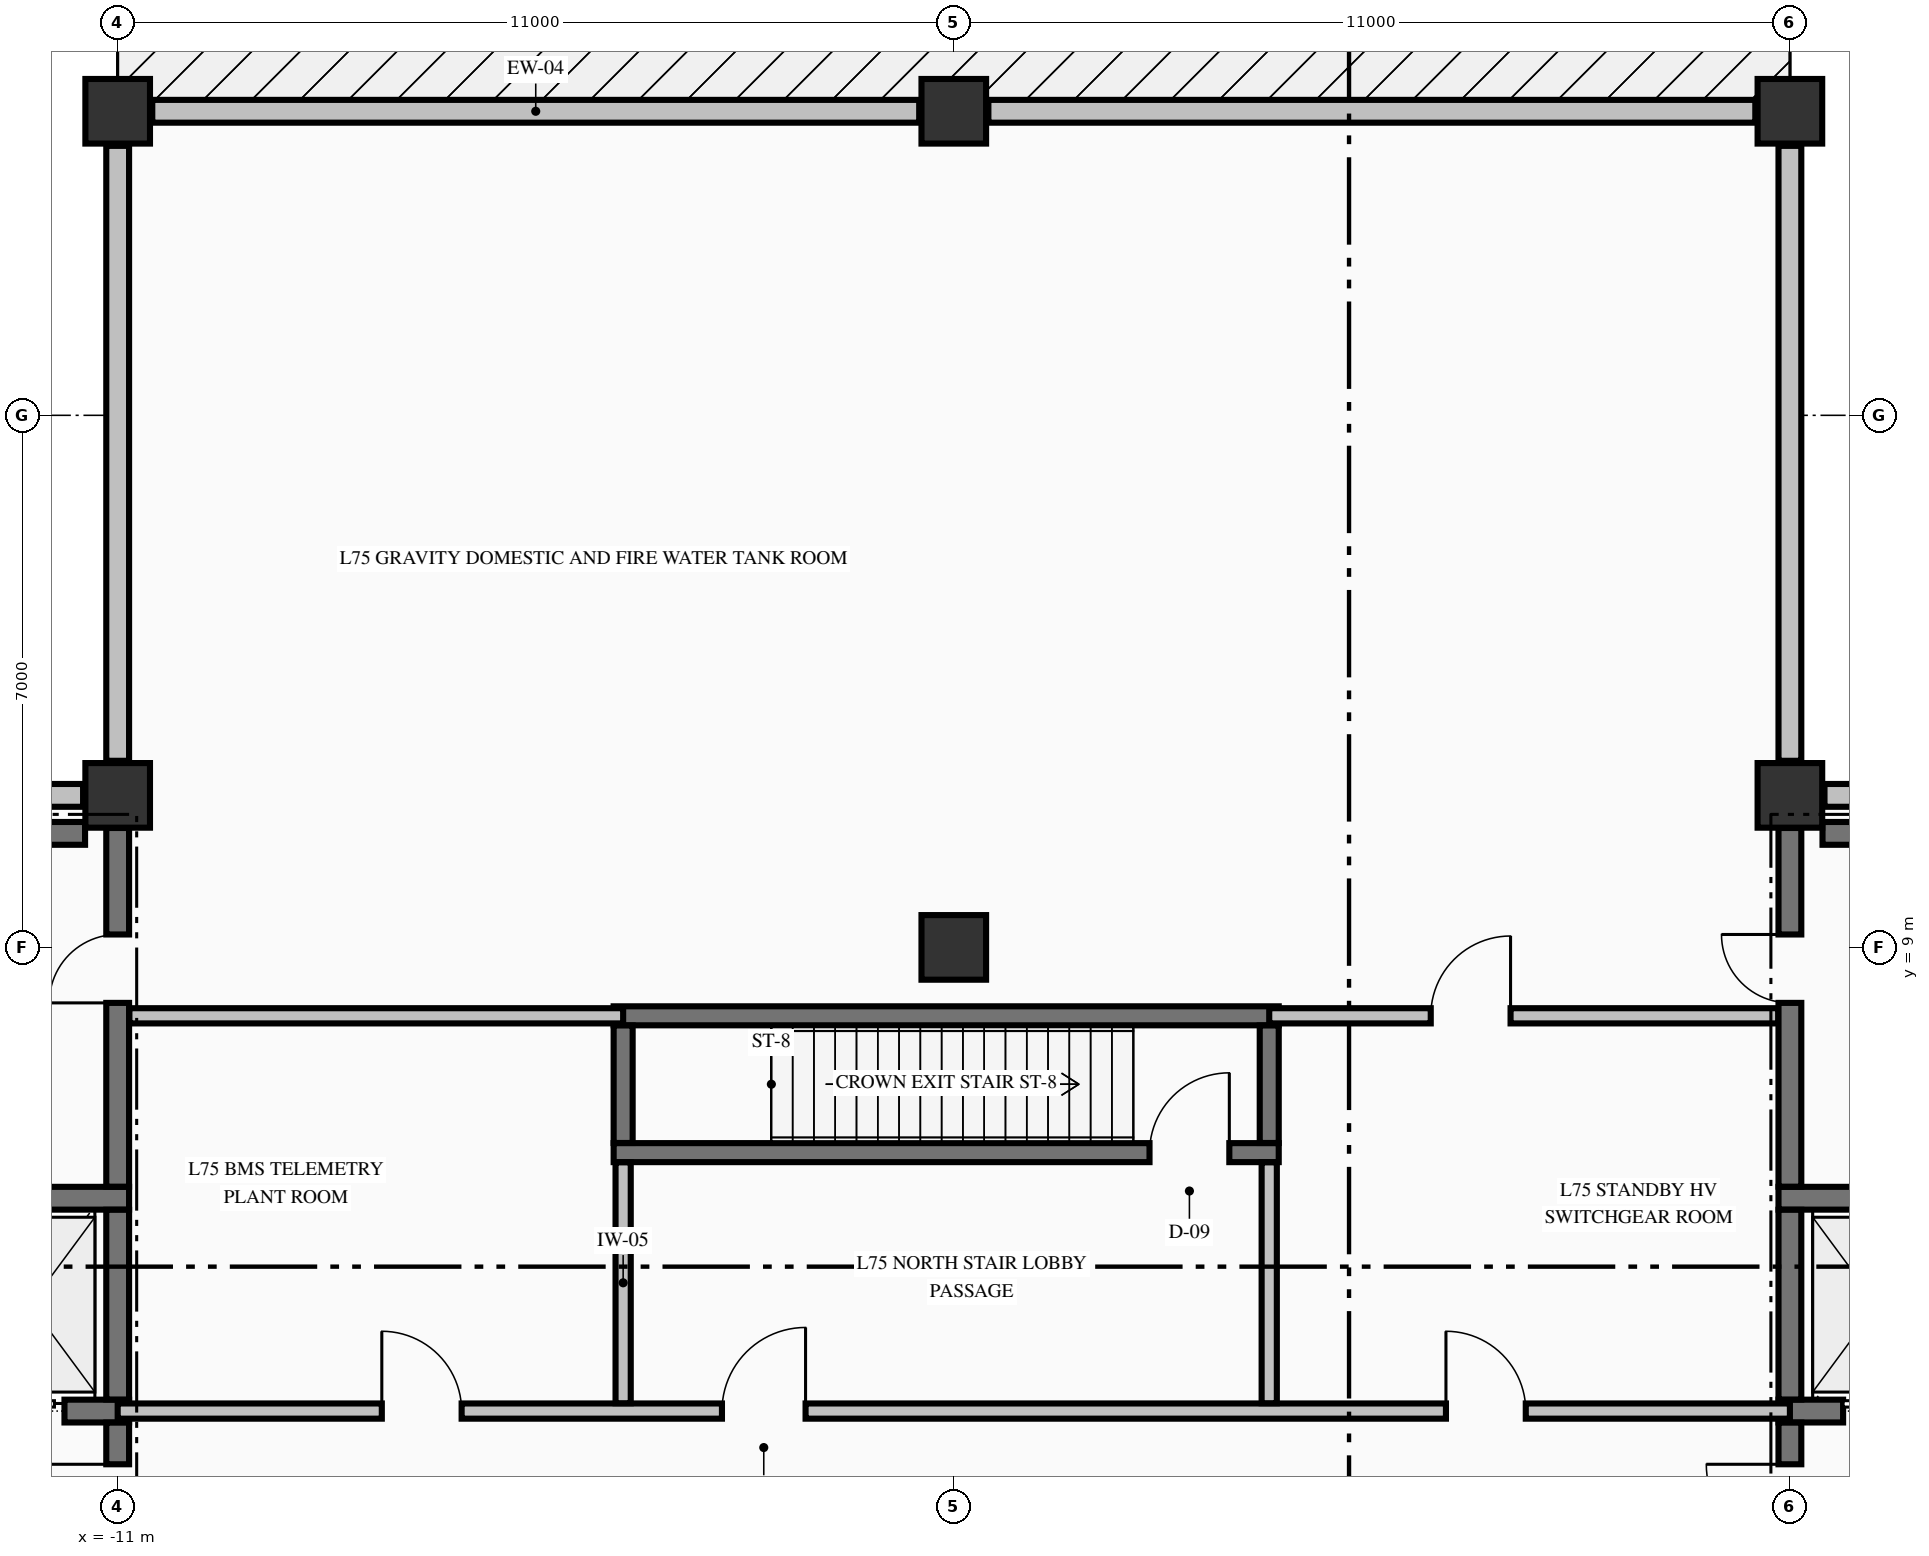
"""IFC4 building model, lengths in metres.
Left out: names, types, materials, properties, quantities, classifications, styles, units other than length and angle.
Written with IfcOpenShell. Run it as: python <this file> out.ifc"""

import sys

from ifc_helpers import new_model, si_unit, direction, frame, frame_2d, origin, origin_2d, place, context, subcontext, project, spatial, rectangle, extrude, element, fill, save


model = new_model("IFC4")
c1 = context("Model", 3, precision=1e-05, world=origin(), true_north=direction((0.0, 1.0)))
c2 = subcontext(c1, "Body", "Model", "MODEL_VIEW")
j1 = project(units=[si_unit("LENGTHUNIT", "METRE"), si_unit("PLANEANGLEUNIT", "RADIAN")], contexts=[c1])
p1 = place(None, origin())
s1 = spatial("IfcSite", under=j1, at=p1, CompositionType="ELEMENT")
p2 = place(p1, origin())
s2 = spatial("IfcBuilding", under=s1, at=p2, CompositionType="ELEMENT")
p3 = place(p2, frame((0.0, 0.0, 281.8)))
s3 = spatial("IfcBuildingStorey", under=s2, at=p3, CompositionType="ELEMENT", Elevation=281.8)
for number, where, z_axis, x_axis in (
    (1, (11.0, 20.0, -0.325), (0.0, 0.0, 1.0), (1.0, 0.0, 0.0)),
    (2, (0.0, 20.0, -0.325), (0.0, 0.0, 1.0), (1.0, 0.0, 0.0)),
    (3, (-11.0, 20.0, -0.325), (0.0, 0.0, 1.0), (1.0, 0.0, 0.0)),
    (4, (-11.0, 11.0, -0.325), (0.0, 0.0, 1.0), (1.0, 0.0, 0.0)),
    (5, (11.0, 11.0, -0.325), (0.0, 0.0, 1.0), (1.0, 0.0, 0.0)),
    (6, (0.0, 9.0, -0.325), (0.0, 0.0, 1.0), (1.0, 0.0, 0.0)),
):
    element("IfcColumn", number, at=place(p3, frame(where, z_axis=z_axis, x_axis=x_axis)), inside=s3, PredefinedType="COLUMN", context=c2, shape_type="SweptSolid", body=[
        extrude(rectangle(XDim=0.85, YDim=0.85, at=origin_2d()), origin(), (0.0, 0.0, 1.0), 3.06),
    ])
for number, where, z_axis, x_axis in (
    (7, (-0.455, 20.0, 0.0), (0.0, 0.0, 1.0), (-1.0, 0.0, 0.0)),
    (8, (10.545, 20.0, 0.0), (0.0, 0.0, 1.0), (-1.0, 0.0, 0.0)),
):
    element("IfcWall", number, at=place(p3, frame(where, z_axis=z_axis, x_axis=x_axis)), inside=s3, PredefinedType="STANDARD", context=c2, shape_type="SweptSolid", body=[
        extrude(rectangle(XDim=10.09, YDim=0.3, at=frame_2d((5.045, 0.0))), origin(), (0.0, 0.0, 1.0), 2.127),
    ])
p4 = place(p3, frame((19.545, 11.0, 0.0), z_axis=(0.0, 0.0, 1.0), x_axis=(-1.0, 0.0, 0.0)))
e9 = element("IfcWall", 9, at=p4, inside=s3, PredefinedType="STANDARD", context=c2, shape_type="SweptSolid", body=[
    extrude(rectangle(XDim=8.09, YDim=0.3, at=frame_2d((4.045, 0.0))), origin(), (0.0, 0.0, 1.0), 1.077),
])
for number, where, z_axis, x_axis in (
    (10, (11.0, 11.455, 0.0), (0.0, 0.0, 1.0), (0.0, 1.0, 0.0)),
    (11, (-11.0, 19.545, 0.0), (0.0, 0.0, 1.0), (0.0, -1.0, 0.0)),
):
    element("IfcWall", number, at=place(p3, frame(where, z_axis=z_axis, x_axis=x_axis)), inside=s3, PredefinedType="STANDARD", context=c2, shape_type="SweptSolid", body=[
        extrude(rectangle(XDim=8.09, YDim=0.3, at=frame_2d((4.045, 0.0))), origin(), (0.0, 0.0, 1.0), 0.927),
    ])
p5 = place(p3, frame((-11.455, 11.0, 0.0), z_axis=(0.0, 0.0, 1.0), x_axis=(-1.0, 0.0, 0.0)))
e12 = element("IfcWall", 12, at=p5, inside=s3, PredefinedType="STANDARD", context=c2, shape_type="SweptSolid", body=[
    extrude(rectangle(XDim=8.09, YDim=0.3, at=frame_2d((4.045, 0.0))), origin(), (0.0, 0.0, 1.0), 1.077),
])
p6 = place(p3, frame((-14.85, 2.9, 0.0), z_axis=(0.0, 0.0, 1.0), x_axis=(1.0, 0.0, 0.0)))
e13 = element("IfcWall", 13, at=p6, inside=s3, PredefinedType="SHEAR", context=c2, shape_type="SweptSolid", body=[
    extrude(rectangle(XDim=4.0, YDim=0.3, at=frame_2d((2.0, 0.0))), origin(), (0.0, 0.0, 1.0), 2.735),
])
p7 = place(p6, frame((2.05, 0.0, 0.0)))
e14 = element("IfcOpeningElement", 14, at=p7, cuts=e13, PredefinedType="OPENING", context=c2, shape_type="SweptSolid", body=[
    extrude(rectangle(XDim=1.1, YDim=2.2, at=frame_2d((0.55, 1.1))), frame((0.0, 0.16, 0.0), z_axis=(0.0, -1.0, 0.0), x_axis=(1.0, 0.0, 0.0)), (0.0, 0.0, 1.0), 0.32),
])
p8 = place(p3, frame((10.85, 2.9, 0.0), z_axis=(0.0, 0.0, 1.0), x_axis=(1.0, 0.0, 0.0)))
e15 = element("IfcWall", 15, at=p8, inside=s3, PredefinedType="SHEAR", context=c2, shape_type="SweptSolid", body=[
    extrude(rectangle(XDim=4.0, YDim=0.3, at=frame_2d((2.0, 0.0))), origin(), (0.0, 0.0, 1.0), 2.735),
])
p9 = place(p8, frame((0.85, 0.0, 0.0)))
e16 = element("IfcOpeningElement", 16, at=p9, cuts=e15, PredefinedType="OPENING", context=c2, shape_type="SweptSolid", body=[
    extrude(rectangle(XDim=1.1, YDim=2.2, at=frame_2d((0.55, 1.1))), frame((0.0, 0.16, 0.0), z_axis=(0.0, -1.0, 0.0), x_axis=(1.0, 0.0, 0.0)), (0.0, 0.0, 1.0), 0.32),
])
for number, where, z_axis, x_axis in (
    (17, (-14.85, 5.7, 0.0), (0.0, 0.0, 1.0), (1.0, 0.0, 0.0)),
    (18, (10.85, 5.7, 0.0), (0.0, 0.0, 1.0), (1.0, 0.0, 0.0)),
):
    element("IfcWall", number, at=place(p3, frame(where, z_axis=z_axis, x_axis=x_axis)), inside=s3, PredefinedType="SHEAR", context=c2, shape_type="SweptSolid", body=[
        extrude(rectangle(XDim=4.0, YDim=0.3, at=frame_2d((2.0, 0.0))), origin(), (0.0, 0.0, 1.0), 2.735),
    ])
p10 = place(p3, frame((-4.475, 6.3, 0.0), z_axis=(0.0, 0.0, 1.0), x_axis=(1.0, 0.0, 0.0)))
e19 = element("IfcWall", 19, at=p10, inside=s3, PredefinedType="SOLIDWALL", context=c2, shape_type="SweptSolid", body=[
    extrude(rectangle(XDim=8.75, YDim=0.25, at=frame_2d((4.375, 0.0))), origin(), (0.0, 0.0, 1.0), 2.735),
])
p11 = place(p10, frame((7.05, 0.0, 0.0)))
e20 = element("IfcOpeningElement", 20, at=p11, cuts=e19, PredefinedType="OPENING", context=c2, shape_type="SweptSolid", body=[
    extrude(rectangle(XDim=1.05, YDim=2.15, at=frame_2d((0.525, 1.075))), frame((0.0, 0.135, 0.0), z_axis=(0.0, -1.0, 0.0), x_axis=(1.0, 0.0, 0.0)), (0.0, 0.0, 1.0), 0.27),
])
p12 = place(p3, frame((-4.475, 8.1, 0.0), z_axis=(0.0, 0.0, 1.0), x_axis=(1.0, 0.0, 0.0)))
e21 = element("IfcWall", 21, at=p12, inside=s3, PredefinedType="SOLIDWALL", context=c2, shape_type="SweptSolid", body=[
    extrude(rectangle(XDim=8.75, YDim=0.25, at=frame_2d((4.375, 0.0))), origin(), (0.0, 0.0, 1.0), 2.735),
])
for number, where, z_axis, x_axis in (
    (22, (-14.85, 10.5, 0.0), (0.0, 0.0, 1.0), (1.0, 0.0, 0.0)),
    (23, (11.429, 10.5, 0.0), (0.0, 0.0, 1.0), (1.0, 0.0, 0.0)),
):
    element("IfcWall", number, at=place(p3, frame(where, z_axis=z_axis, x_axis=x_axis)), inside=s3, PredefinedType="SHEAR", context=c2, shape_type="SweptSolid", body=[
        extrude(rectangle(XDim=3.421, YDim=0.3, at=frame_2d((1.71, 0.0))), origin(), (0.0, 0.0, 1.0), 2.735),
    ])
p13 = place(p3, frame((-11.0, 2.9, 0.0), z_axis=(0.0, 0.0, 1.0), x_axis=(1.0, 0.0, 0.0)))
e24 = element("IfcWall", 24, at=p13, inside=s3, PredefinedType="PARTITIONING", context=c2, shape_type="SweptSolid", body=[
    extrude(rectangle(XDim=22.0, YDim=0.2, at=frame_2d((11.0, 0.0))), origin(), (0.0, 0.0, 1.0), 2.735),
])
p14 = place(p13, frame((7.95, 0.0, 0.0)))
e25 = element("IfcOpeningElement", 25, at=p14, cuts=e24, PredefinedType="OPENING", context=c2, shape_type="SweptSolid", body=[
    extrude(rectangle(XDim=1.1, YDim=2.15, at=frame_2d((0.55, 1.075))), frame((0.0, 0.11, 0.0), z_axis=(0.0, -1.0, 0.0), x_axis=(1.0, 0.0, 0.0)), (0.0, 0.0, 1.0), 0.22),
])
p15 = place(p13, frame((17.475, 0.0, 0.0)))
e26 = element("IfcOpeningElement", 26, at=p15, cuts=e24, PredefinedType="OPENING", context=c2, shape_type="SweptSolid", body=[
    extrude(rectangle(XDim=1.05, YDim=2.15, at=frame_2d((0.525, 1.075))), frame((0.0, 0.11, 0.0), z_axis=(0.0, -1.0, 0.0), x_axis=(1.0, 0.0, 0.0)), (0.0, 0.0, 1.0), 0.22),
])
p16 = place(p13, frame((3.475, 0.0, 0.0)))
e27 = element("IfcOpeningElement", 27, at=p16, cuts=e24, PredefinedType="OPENING", context=c2, shape_type="SweptSolid", body=[
    extrude(rectangle(XDim=1.05, YDim=2.15, at=frame_2d((0.525, 1.075))), frame((0.0, 0.11, 0.0), z_axis=(0.0, -1.0, 0.0), x_axis=(1.0, 0.0, 0.0)), (0.0, 0.0, 1.0), 0.22),
])
p17 = place(p3, frame((-10.847, 8.1, 0.0), z_axis=(0.0, 0.0, 1.0), x_axis=(1.0, 0.0, 0.0)))
e28 = element("IfcWall", 28, at=p17, inside=s3, PredefinedType="PARTITIONING", context=c2, shape_type="SweptSolid", body=[
    extrude(rectangle(XDim=6.497, YDim=0.2, at=frame_2d((3.249, 0.0))), origin(), (0.0, 0.0, 1.0), 2.735),
])
p18 = place(p3, frame((4.15, 8.1, 0.0), z_axis=(0.0, 0.0, 1.0), x_axis=(1.0, 0.0, 0.0)))
e29 = element("IfcWall", 29, at=p18, inside=s3, PredefinedType="PARTITIONING", context=c2, shape_type="SweptSolid", body=[
    extrude(rectangle(XDim=6.697, YDim=0.2, at=frame_2d((3.349, 0.0))), origin(), (0.0, 0.0, 1.0), 2.735),
])
p19 = place(p18, frame((2.125, 0.0, 0.0)))
e30 = element("IfcOpeningElement", 30, at=p19, cuts=e29, PredefinedType="OPENING", context=c2, shape_type="SweptSolid", body=[
    extrude(rectangle(XDim=1.05, YDim=2.15, at=frame_2d((0.525, 1.075))), frame((0.0, 0.11, 0.0), z_axis=(0.0, -1.0, 0.0), x_axis=(1.0, 0.0, 0.0)), (0.0, 0.0, 1.0), 0.22),
])
p20 = place(p3, frame((-11.0, 0.429, 0.0), z_axis=(0.0, 0.0, 1.0), x_axis=(0.0, 1.0, 0.0)))
e31 = element("IfcWall", 31, at=p20, inside=s3, PredefinedType="SHEAR", context=c2, shape_type="SweptSolid", body=[
    extrude(rectangle(XDim=2.319, YDim=0.3, at=frame_2d((1.16, 0.0))), origin(), (0.0, 0.0, 1.0), 2.735),
])
p21 = place(p20, frame((0.671, 0.0, 0.0)))
e32 = element("IfcOpeningElement", 32, at=p21, cuts=e31, PredefinedType="OPENING", context=c2, shape_type="SweptSolid", body=[
    extrude(rectangle(XDim=1.1, YDim=2.15, at=frame_2d((0.55, 1.075))), frame((0.0, 0.16, 0.0), z_axis=(0.0, -1.0, 0.0), x_axis=(1.0, 0.0, 0.0)), (0.0, 0.0, 1.0), 0.32),
])
p22 = place(p3, frame((-11.0, 3.052, 0.0), z_axis=(0.0, 0.0, 1.0), x_axis=(0.0, 1.0, 0.0)))
e33 = element("IfcWall", 33, at=p22, inside=s3, PredefinedType="SHEAR", context=c2, shape_type="SweptSolid", body=[
    extrude(rectangle(XDim=2.496, YDim=0.3, at=frame_2d((1.248, 0.0))), origin(), (0.0, 0.0, 1.0), 2.735),
])
p23 = place(p3, frame((-11.0, 5.852, 0.0), z_axis=(0.0, 0.0, 1.0), x_axis=(0.0, 1.0, 0.0)))
e34 = element("IfcWall", 34, at=p23, inside=s3, PredefinedType="SHEAR", context=c2, shape_type="SweptSolid", body=[
    extrude(rectangle(XDim=4.719, YDim=0.3, at=frame_2d((2.359, 0.0))), origin(), (0.0, 0.0, 1.0), 2.735),
])
p24 = place(p23, frame((2.418, 0.0, 0.0)))
e35 = element("IfcOpeningElement", 35, at=p24, cuts=e34, PredefinedType="OPENING", context=c2, shape_type="SweptSolid", body=[
    extrude(rectangle(XDim=0.9, YDim=2.15, at=frame_2d((0.45, 1.075))), frame((0.0, 0.16, 0.0), z_axis=(0.0, -1.0, 0.0), x_axis=(1.0, 0.0, 0.0)), (0.0, 0.0, 1.0), 0.32),
])
for number, where, z_axis, x_axis in (
    (36, (-4.35, 6.427, 0.0), (0.0, 0.0, 1.0), (0.0, 1.0, 0.0)),
    (37, (4.15, 6.427, 0.0), (0.0, 0.0, 1.0), (0.0, 1.0, 0.0)),
):
    element("IfcWall", number, at=place(p3, frame(where, z_axis=z_axis, x_axis=x_axis)), inside=s3, PredefinedType="SOLIDWALL", context=c2, shape_type="SweptSolid", body=[
        extrude(rectangle(XDim=1.546, YDim=0.25, at=frame_2d((0.773, 0.0))), origin(), (0.0, 0.0, 1.0), 2.735),
    ])
p25 = place(p3, frame((11.0, 0.429, 0.0), z_axis=(0.0, 0.0, 1.0), x_axis=(0.0, 1.0, 0.0)))
e38 = element("IfcWall", 38, at=p25, inside=s3, PredefinedType="SHEAR", context=c2, shape_type="SweptSolid", body=[
    extrude(rectangle(XDim=2.319, YDim=0.3, at=frame_2d((1.16, 0.0))), origin(), (0.0, 0.0, 1.0), 2.735),
])
p26 = place(p25, frame((0.671, 0.0, 0.0)))
e39 = element("IfcOpeningElement", 39, at=p26, cuts=e38, PredefinedType="OPENING", context=c2, shape_type="SweptSolid", body=[
    extrude(rectangle(XDim=1.1, YDim=2.15, at=frame_2d((0.55, 1.075))), frame((0.0, 0.16, 0.0), z_axis=(0.0, -1.0, 0.0), x_axis=(1.0, 0.0, 0.0)), (0.0, 0.0, 1.0), 0.32),
])
p27 = place(p3, frame((11.0, 3.052, 0.0), z_axis=(0.0, 0.0, 1.0), x_axis=(0.0, 1.0, 0.0)))
e40 = element("IfcWall", 40, at=p27, inside=s3, PredefinedType="SHEAR", context=c2, shape_type="SweptSolid", body=[
    extrude(rectangle(XDim=2.496, YDim=0.3, at=frame_2d((1.248, 0.0))), origin(), (0.0, 0.0, 1.0), 2.735),
])
p28 = place(p3, frame((11.0, 5.852, 0.0), z_axis=(0.0, 0.0, 1.0), x_axis=(0.0, 1.0, 0.0)))
e41 = element("IfcWall", 41, at=p28, inside=s3, PredefinedType="SHEAR", context=c2, shape_type="SweptSolid", body=[
    extrude(rectangle(XDim=4.719, YDim=0.3, at=frame_2d((2.359, 0.0))), origin(), (0.0, 0.0, 1.0), 2.735),
])
p29 = place(p28, frame((2.418, 0.0, 0.0)))
e42 = element("IfcOpeningElement", 42, at=p29, cuts=e41, PredefinedType="OPENING", context=c2, shape_type="SweptSolid", body=[
    extrude(rectangle(XDim=0.9, YDim=2.15, at=frame_2d((0.45, 1.075))), frame((0.0, 0.16, 0.0), z_axis=(0.0, -1.0, 0.0), x_axis=(1.0, 0.0, 0.0)), (0.0, 0.0, 1.0), 0.32),
])
for number, where, z_axis, x_axis in (
    (43, (-4.35, 3.003, 0.0), (0.0, 0.0, 1.0), (0.0, 1.0, 0.0)),
    (44, (4.15, 3.003, 0.0), (0.0, 0.0, 1.0), (0.0, 1.0, 0.0)),
):
    element("IfcWall", number, at=place(p3, frame(where, z_axis=z_axis, x_axis=x_axis)), inside=s3, PredefinedType="PARTITIONING", context=c2, shape_type="SweptSolid", body=[
        extrude(rectangle(XDim=3.169, YDim=0.2, at=frame_2d((1.584, 0.0))), origin(), (0.0, 0.0, 1.0), 2.735),
    ])
p30 = place(p21, origin())
e45 = element("IfcDoor", 45, at=p30, inside=s3, OperationType="SINGLE_SWING_RIGHT", PredefinedType="DOOR", context=c2, shape_type="SweptSolid", body=[
    extrude(rectangle(XDim=1.1, YDim=2.15, at=frame_2d((0.55, 1.075))), frame((0.0, 0.025, 0.0), z_axis=(0.0, -1.0, 0.0), x_axis=(1.0, 0.0, 0.0)), (0.0, 0.0, 1.0), 0.05),
])
fill(e32, e45)
p31 = place(p7, origin())
e46 = element("IfcDoor", 46, at=p31, inside=s3, OperationType="SLIDING_TO_LEFT", PredefinedType="DOOR", context=c2, shape_type="SweptSolid", body=[
    extrude(rectangle(XDim=1.1, YDim=2.2, at=frame_2d((0.55, 1.1))), frame((0.0, 0.025, 0.0), z_axis=(0.0, -1.0, 0.0), x_axis=(1.0, 0.0, 0.0)), (0.0, 0.0, 1.0), 0.05),
])
fill(e14, e46)
p32 = place(p26, origin())
e47 = element("IfcDoor", 47, at=p32, inside=s3, OperationType="SINGLE_SWING_RIGHT", PredefinedType="DOOR", context=c2, shape_type="SweptSolid", body=[
    extrude(rectangle(XDim=1.1, YDim=2.15, at=frame_2d((0.55, 1.075))), frame((0.0, 0.025, 0.0), z_axis=(0.0, -1.0, 0.0), x_axis=(1.0, 0.0, 0.0)), (0.0, 0.0, 1.0), 0.05),
])
fill(e39, e47)
p33 = place(p9, origin())
e48 = element("IfcDoor", 48, at=p33, inside=s3, OperationType="SLIDING_TO_RIGHT", PredefinedType="DOOR", context=c2, shape_type="SweptSolid", body=[
    extrude(rectangle(XDim=1.1, YDim=2.2, at=frame_2d((0.55, 1.1))), frame((0.0, 0.025, 0.0), z_axis=(0.0, -1.0, 0.0), x_axis=(1.0, 0.0, 0.0)), (0.0, 0.0, 1.0), 0.05),
])
fill(e16, e48)
p34 = place(p24, origin())
e49 = element("IfcDoor", 49, at=p34, inside=s3, OperationType="SINGLE_SWING_LEFT", PredefinedType="DOOR", context=c2, shape_type="SweptSolid", body=[
    extrude(rectangle(XDim=0.9, YDim=2.15, at=frame_2d((0.45, 1.075))), frame((0.0, 0.025, 0.0), z_axis=(0.0, -1.0, 0.0), x_axis=(1.0, 0.0, 0.0)), (0.0, 0.0, 1.0), 0.05),
])
fill(e35, e49)
p35 = place(p29, origin())
e50 = element("IfcDoor", 50, at=p35, inside=s3, OperationType="SINGLE_SWING_RIGHT", PredefinedType="DOOR", context=c2, shape_type="SweptSolid", body=[
    extrude(rectangle(XDim=0.9, YDim=2.15, at=frame_2d((0.45, 1.075))), frame((0.0, 0.025, 0.0), z_axis=(0.0, -1.0, 0.0), x_axis=(1.0, 0.0, 0.0)), (0.0, 0.0, 1.0), 0.05),
])
fill(e42, e50)
p36 = place(p11, origin())
e51 = element("IfcDoor", 51, at=p36, inside=s3, OperationType="SINGLE_SWING_RIGHT", PredefinedType="DOOR", context=c2, shape_type="SweptSolid", body=[
    extrude(rectangle(XDim=1.05, YDim=2.15, at=frame_2d((0.525, 1.075))), frame((0.0, 0.025, 0.0), z_axis=(0.0, -1.0, 0.0), x_axis=(1.0, 0.0, 0.0)), (0.0, 0.0, 1.0), 0.05),
])
fill(e20, e51)
p37 = place(p14, origin())
e52 = element("IfcDoor", 52, at=p37, inside=s3, OperationType="SINGLE_SWING_RIGHT", PredefinedType="DOOR", context=c2, shape_type="SweptSolid", body=[
    extrude(rectangle(XDim=1.1, YDim=2.15, at=frame_2d((0.55, 1.075))), frame((0.0, 0.025, 0.0), z_axis=(0.0, -1.0, 0.0), x_axis=(1.0, 0.0, 0.0)), (0.0, 0.0, 1.0), 0.05),
])
fill(e25, e52)
p38 = place(p15, origin())
e53 = element("IfcDoor", 53, at=p38, inside=s3, OperationType="SINGLE_SWING_LEFT", PredefinedType="DOOR", context=c2, shape_type="SweptSolid", body=[
    extrude(rectangle(XDim=1.05, YDim=2.15, at=frame_2d((0.525, 1.075))), frame((0.0, 0.025, 0.0), z_axis=(0.0, -1.0, 0.0), x_axis=(1.0, 0.0, 0.0)), (0.0, 0.0, 1.0), 0.05),
])
fill(e26, e53)
p39 = place(p19, origin())
e54 = element("IfcDoor", 54, at=p39, inside=s3, OperationType="SINGLE_SWING_RIGHT", PredefinedType="DOOR", context=c2, shape_type="SweptSolid", body=[
    extrude(rectangle(XDim=1.05, YDim=2.15, at=frame_2d((0.525, 1.075))), frame((0.0, 0.025, 0.0), z_axis=(0.0, -1.0, 0.0), x_axis=(1.0, 0.0, 0.0)), (0.0, 0.0, 1.0), 0.05),
])
fill(e30, e54)
p40 = place(p16, origin())
e55 = element("IfcDoor", 55, at=p40, inside=s3, OperationType="SINGLE_SWING_LEFT", PredefinedType="DOOR", context=c2, shape_type="SweptSolid", body=[
    extrude(rectangle(XDim=1.05, YDim=2.15, at=frame_2d((0.525, 1.075))), frame((0.0, 0.025, 0.0), z_axis=(0.0, -1.0, 0.0), x_axis=(1.0, 0.0, 0.0)), (0.0, 0.0, 1.0), 0.05),
])
fill(e27, e55)
save(model, sys.argv[1])
